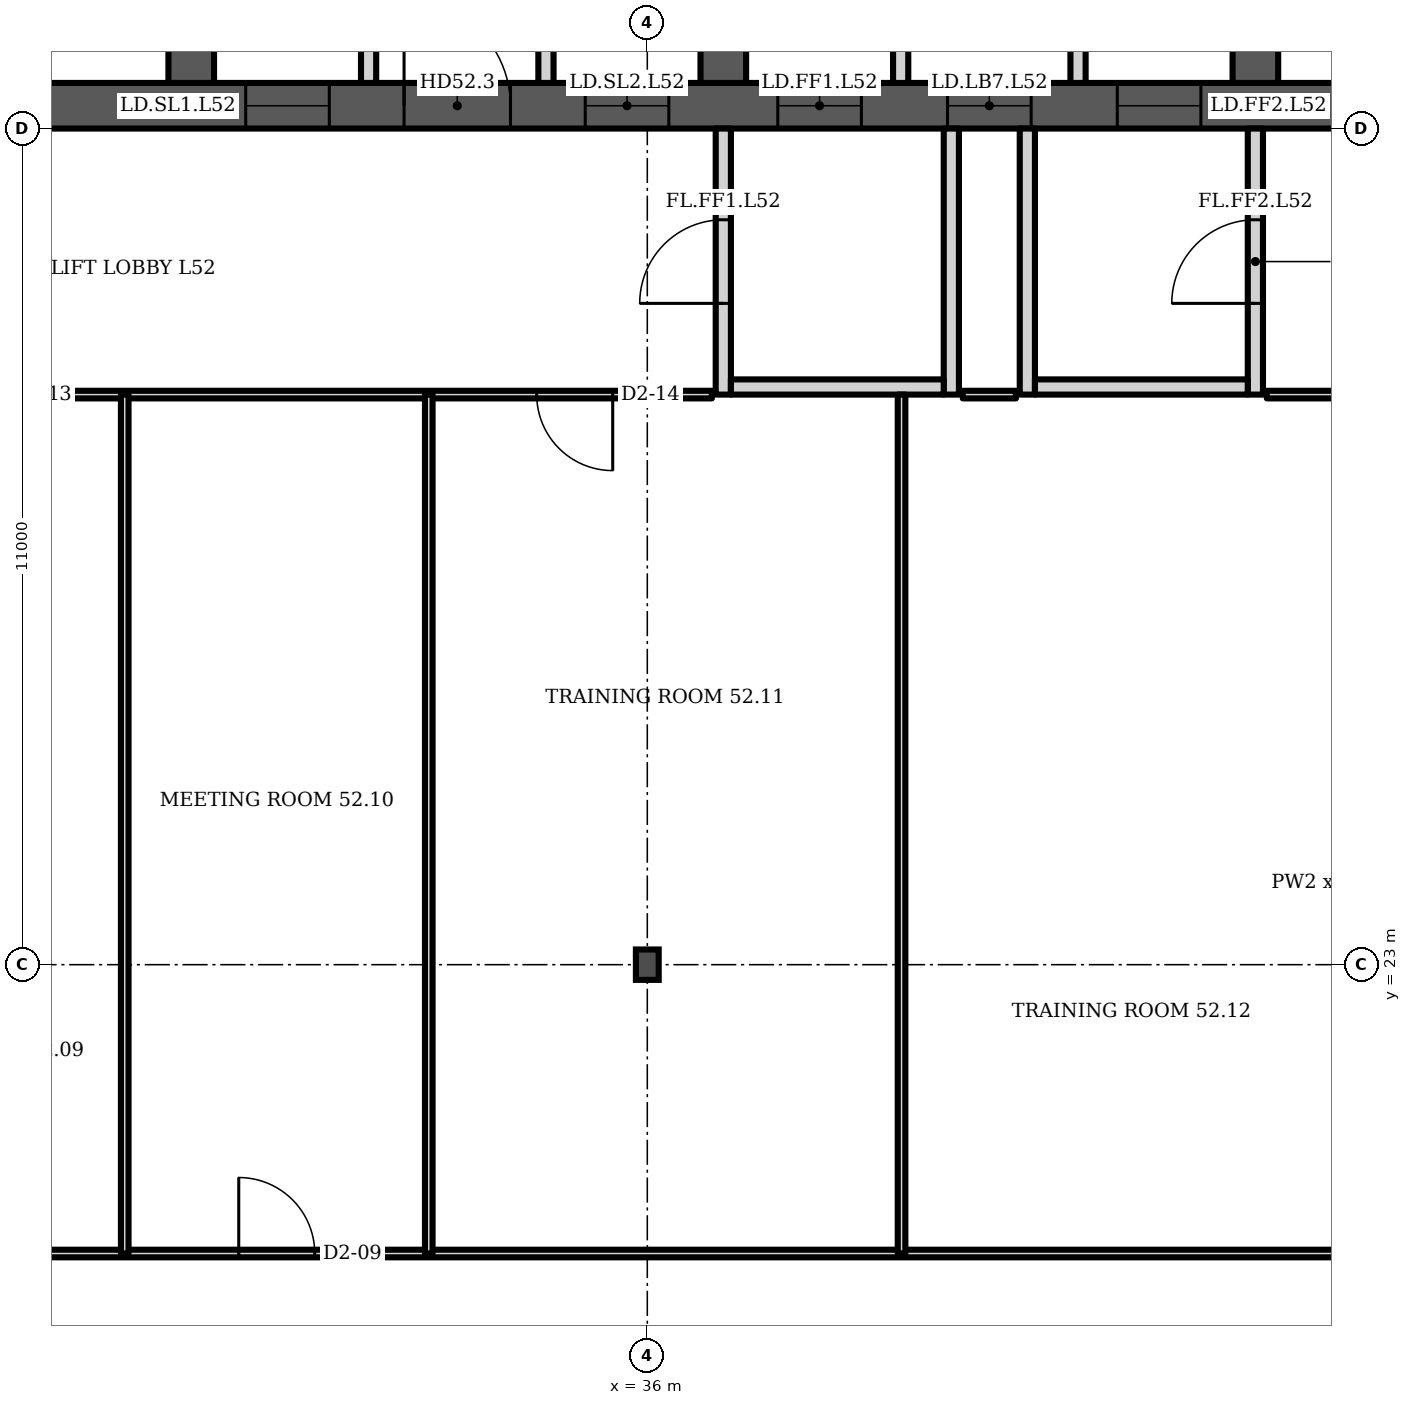
"""IFC4 building model, lengths in metres.
Left out: names, types, materials, properties, quantities, classifications, styles, units other than length and angle.
Written with IfcOpenShell. Run it as: python <this file> out.ifc"""

import sys

from ifc_helpers import new_model, si_unit, direction, frame, frame_2d, origin, origin_2d, place, context, subcontext, project, spatial, polyline, rectangle, i_section, outline, extrude, element, fill, save


model = new_model("IFC4")
c1 = context("Model", 3, precision=1e-05, world=origin(), true_north=direction((0.0, 1.0)))
c2 = subcontext(c1, "Body", "Model", "MODEL_VIEW")
j1 = project(units=[si_unit("LENGTHUNIT", "METRE"), si_unit("PLANEANGLEUNIT", "RADIAN")], contexts=[c1])
p1 = place(None, origin())
s1 = spatial("IfcSite", under=j1, at=p1, CompositionType="ELEMENT")
p2 = place(p1, origin())
s2 = spatial("IfcBuilding", under=s1, at=p2, CompositionType="ELEMENT")
p3 = place(p2, frame((0.0, 0.0, 210.7)))
s3 = spatial("IfcBuildingStorey", under=s2, at=p3, CompositionType="ELEMENT", Elevation=210.7)
p4 = place(p3, frame((23.0, 34.3, 0.0), z_axis=(0.0, 0.0, 1.0), x_axis=(1.0, 0.0, 0.0)))
e1 = element("IfcWall", 1, at=p4, inside=s3, PredefinedType="SHEAR", context=c2, shape_type="SweptSolid", body=[
    extrude(rectangle(XDim=35.0, YDim=0.6, at=frame_2d((17.5, 0.0))), origin(), (0.0, 0.0, 1.0), 3.6),
])
p5 = place(p4, frame((0.65, 0.0, 0.0)))
e2 = element("IfcOpeningElement", 2, at=p5, cuts=e1, PredefinedType="OPENING", context=c2, shape_type="SweptSolid", body=[
    extrude(rectangle(XDim=1.2, YDim=2.1, at=frame_2d((0.6, 1.05))), frame((0.0, 0.31, 0.0), z_axis=(0.0, -1.0, 0.0), x_axis=(1.0, 0.0, 0.0)), (0.0, 0.0, 1.0), 0.62),
])
p6 = place(p4, frame((7.717, 0.0, 0.0)))
e3 = element("IfcOpeningElement", 3, at=p6, cuts=e1, PredefinedType="OPENING", context=c2, shape_type="SweptSolid", body=[
    extrude(rectangle(XDim=1.1, YDim=2.1, at=frame_2d((0.55, 1.05))), frame((0.0, 0.31, 0.0), z_axis=(0.0, -1.0, 0.0), x_axis=(1.0, 0.0, 0.0)), (0.0, 0.0, 1.0), 0.62),
])
p7 = place(p4, frame((12.183, 0.0, 0.0)))
e4 = element("IfcOpeningElement", 4, at=p7, cuts=e1, PredefinedType="OPENING", context=c2, shape_type="SweptSolid", body=[
    extrude(rectangle(XDim=1.1, YDim=2.1, at=frame_2d((0.55, 1.05))), frame((0.0, 0.31, 0.0), z_axis=(0.0, -1.0, 0.0), x_axis=(1.0, 0.0, 0.0)), (0.0, 0.0, 1.0), 0.62),
])
p8 = place(p4, frame((9.8, 0.0, 0.0)))
e5 = element("IfcOpeningElement", 5, at=p8, cuts=e1, PredefinedType="OPENING", context=c2, shape_type="SweptSolid", body=[
    extrude(rectangle(XDim=1.4, YDim=2.1, at=frame_2d((0.7, 1.05))), frame((0.0, 0.31, 0.0), z_axis=(0.0, -1.0, 0.0), x_axis=(1.0, 0.0, 0.0)), (0.0, 0.0, 1.0), 0.62),
])
p9 = place(p4, frame((14.717, 0.0, 0.0)))
e6 = element("IfcOpeningElement", 6, at=p9, cuts=e1, PredefinedType="OPENING", context=c2, shape_type="SweptSolid", body=[
    extrude(rectangle(XDim=1.1, YDim=2.1, at=frame_2d((0.55, 1.05))), frame((0.0, 0.31, 0.0), z_axis=(0.0, -1.0, 0.0), x_axis=(1.0, 0.0, 0.0)), (0.0, 0.0, 1.0), 0.62),
])
p10 = place(p4, frame((16.95, 0.0, 0.0)))
e7 = element("IfcOpeningElement", 7, at=p10, cuts=e1, PredefinedType="OPENING", context=c2, shape_type="SweptSolid", body=[
    extrude(rectangle(XDim=1.1, YDim=2.1, at=frame_2d((0.55, 1.05))), frame((0.0, 0.31, 0.0), z_axis=(0.0, -1.0, 0.0), x_axis=(1.0, 0.0, 0.0)), (0.0, 0.0, 1.0), 0.62),
])
p11 = place(p4, frame((19.183, 0.0, 0.0)))
e8 = element("IfcOpeningElement", 8, at=p11, cuts=e1, PredefinedType="OPENING", context=c2, shape_type="SweptSolid", body=[
    extrude(rectangle(XDim=1.1, YDim=2.1, at=frame_2d((0.55, 1.05))), frame((0.0, 0.31, 0.0), z_axis=(0.0, -1.0, 0.0), x_axis=(1.0, 0.0, 0.0)), (0.0, 0.0, 1.0), 0.62),
])
p12 = place(p4, frame((26.15, 0.0, 0.0)))
e9 = element("IfcOpeningElement", 9, at=p12, cuts=e1, PredefinedType="OPENING", context=c2, shape_type="SweptSolid", body=[
    extrude(rectangle(XDim=1.2, YDim=2.1, at=frame_2d((0.6, 1.05))), frame((0.0, 0.31, 0.0), z_axis=(0.0, -1.0, 0.0), x_axis=(1.0, 0.0, 0.0)), (0.0, 0.0, 1.0), 0.62),
])
p13 = place(p4, frame((28.767, 0.0, 0.0)))
e10 = element("IfcOpeningElement", 10, at=p13, cuts=e1, PredefinedType="OPENING", context=c2, shape_type="SweptSolid", body=[
    extrude(rectangle(XDim=1.0, YDim=2.1, at=frame_2d((0.5, 1.05))), frame((0.0, 0.31, 0.0), z_axis=(0.0, -1.0, 0.0), x_axis=(1.0, 0.0, 0.0)), (0.0, 0.0, 1.0), 0.62),
])
p14 = place(p4, frame((33.083, 0.0, 0.0)))
e11 = element("IfcOpeningElement", 11, at=p14, cuts=e1, PredefinedType="OPENING", context=c2, shape_type="SweptSolid", body=[
    extrude(rectangle(XDim=1.0, YDim=2.1, at=frame_2d((0.5, 1.05))), frame((0.0, 0.31, 0.0), z_axis=(0.0, -1.0, 0.0), x_axis=(1.0, 0.0, 0.0)), (0.0, 0.0, 1.0), 0.62),
])
p15 = place(p4, frame((30.8, 0.0, 0.0)))
e12 = element("IfcOpeningElement", 12, at=p15, cuts=e1, PredefinedType="OPENING", context=c2, shape_type="SweptSolid", body=[
    extrude(rectangle(XDim=1.4, YDim=2.1, at=frame_2d((0.7, 1.05))), frame((0.0, 0.31, 0.0), z_axis=(0.0, -1.0, 0.0), x_axis=(1.0, 0.0, 0.0)), (0.0, 0.0, 1.0), 0.62),
])
p16 = place(p3, frame((30.0, 34.6, 0.0), z_axis=(0.0, 0.0, 1.0), x_axis=(0.0, 1.0, 0.0)))
e13 = element("IfcWall", 13, at=p16, inside=s3, PredefinedType="SHEAR", context=c2, shape_type="SweptSolid", body=[
    extrude(rectangle(XDim=14.171, YDim=0.6, at=frame_2d((7.085, 0.0))), origin(), (0.0, 0.0, 1.0), 3.6),
])
p17 = place(p16, frame((3.8, 0.0, 0.0)))
e14 = element("IfcOpeningElement", 14, at=p17, cuts=e13, PredefinedType="OPENING", context=c2, shape_type="SweptSolid", body=[
    extrude(rectangle(XDim=1.1, YDim=2.1, at=frame_2d((0.55, 1.05))), frame((0.0, 0.31, 0.0), z_axis=(0.0, -1.0, 0.0), x_axis=(1.0, 0.0, 0.0)), (0.0, 0.0, 1.0), 0.62),
])
p18 = place(p3, frame((37.0, 34.6, 0.0), z_axis=(0.0, 0.0, 1.0), x_axis=(0.0, 1.0, 0.0)))
e15 = element("IfcWall", 15, at=p18, inside=s3, PredefinedType="SHEAR", context=c2, shape_type="SweptSolid", body=[
    extrude(rectangle(XDim=14.784, YDim=0.6, at=frame_2d((7.392, 0.0))), origin(), (0.0, 0.0, 1.0), 3.6),
])
p19 = place(p18, frame((11.302, 0.0, 0.0)))
e16 = element("IfcOpeningElement", 16, at=p19, cuts=e15, PredefinedType="OPENING", context=c2, shape_type="SweptSolid", body=[
    extrude(rectangle(XDim=1.0, YDim=2.1, at=frame_2d((0.5, 1.05))), frame((0.0, 0.31, 0.0), z_axis=(0.0, -1.0, 0.0), x_axis=(1.0, 0.0, 0.0)), (0.0, 0.0, 1.0), 0.62),
])
p20 = place(p18, frame((3.8, 0.0, 0.0)))
e17 = element("IfcOpeningElement", 17, at=p20, cuts=e15, PredefinedType="OPENING", context=c2, shape_type="SweptSolid", body=[
    extrude(rectangle(XDim=1.1, YDim=2.1, at=frame_2d((0.55, 1.05))), frame((0.0, 0.31, 0.0), z_axis=(0.0, -1.0, 0.0), x_axis=(1.0, 0.0, 0.0)), (0.0, 0.0, 1.0), 0.62),
])
p21 = place(p3, frame((44.0, 34.6, 0.0), z_axis=(0.0, 0.0, 1.0), x_axis=(0.0, 1.0, 0.0)))
e18 = element("IfcWall", 18, at=p21, inside=s3, PredefinedType="SHEAR", context=c2, shape_type="SweptSolid", body=[
    extrude(rectangle(XDim=14.784, YDim=0.6, at=frame_2d((7.392, 0.0))), origin(), (0.0, 0.0, 1.0), 3.6),
])
p22 = place(p21, frame((11.608, 0.0, 0.0)))
e19 = element("IfcOpeningElement", 19, at=p22, cuts=e18, PredefinedType="OPENING", context=c2, shape_type="SweptSolid", body=[
    extrude(rectangle(XDim=1.0, YDim=2.1, at=frame_2d((0.5, 1.05))), frame((0.0, 0.31, 0.0), z_axis=(0.0, -1.0, 0.0), x_axis=(1.0, 0.0, 0.0)), (0.0, 0.0, 1.0), 0.62),
])
p23 = place(p21, frame((3.8, 0.0, 0.0)))
e20 = element("IfcOpeningElement", 20, at=p23, cuts=e18, PredefinedType="OPENING", context=c2, shape_type="SweptSolid", body=[
    extrude(rectangle(XDim=1.1, YDim=2.1, at=frame_2d((0.55, 1.05))), frame((0.0, 0.31, 0.0), z_axis=(0.0, -1.0, 0.0), x_axis=(1.0, 0.0, 0.0)), (0.0, 0.0, 1.0), 0.62),
])
p24 = place(p3, frame((36.0, 23.0, 0.0), z_axis=(0.0, 0.0, 1.0), x_axis=(1.0, 0.0, 0.0)))
e21 = element("IfcColumn", 21, at=p24, inside=s3, PredefinedType="COLUMN", context=c2, shape_type="SweptSolid", body=[
    extrude(i_section(OverallWidth=0.3, OverallDepth=0.4, WebThickness=0.013, FlangeThickness=0.024, FilletRadius=0.027, at=origin_2d()), origin(), (0.0, 0.0, 1.0), 3.6),
])
p25 = place(p3, frame((0.0, 0.0, -0.0)))
e22 = element("IfcWall", 22, at=p25, inside=s3, PredefinedType="PARTITIONING", context=c2, shape_type="SweptSolid", body=[
    extrude(outline(polyline([(32.233, 37.45), (30.3, 37.45), (30.3, 37.65), (32.233, 37.65), (32.433, 37.65), (32.433, 34.6), (32.233, 34.6), (32.233, 37.45)])), origin(), (0.0, 0.0, 1.0), 3.2),
])
p26 = place(p3, frame((0.0, 0.0, -0.0)))
e23 = element("IfcWall", 23, at=p26, inside=s3, PredefinedType="PARTITIONING", context=c2, shape_type="SweptSolid", body=[
    extrude(outline(polyline([(34.567, 37.65), (34.767, 37.65), (36.7, 37.65), (36.7, 37.45), (34.767, 37.45), (34.767, 34.6), (34.567, 34.6), (34.567, 37.65)])), origin(), (0.0, 0.0, 1.0), 3.2),
])
p27 = place(p3, frame((0.0, 0.0, -0.0)))
e24 = element("IfcWall", 24, at=p27, inside=s3, PredefinedType="PARTITIONING", context=c2, shape_type="SweptSolid", body=[
    extrude(outline(polyline([(41.567, 37.1), (39.433, 37.1), (39.433, 34.6), (39.233, 34.6), (39.233, 37.45), (37.3, 37.45), (37.3, 37.65), (39.233, 37.65), (39.433, 37.65), (39.433, 37.3), (41.567, 37.3), (41.567, 37.35), (41.767, 37.35), (43.7, 37.35), (43.7, 37.15), (41.767, 37.15), (41.767, 34.6), (41.567, 34.6), (41.567, 37.1)])), origin(), (0.0, 0.0, 1.0), 3.2),
])
p28 = place(p3, frame((37.0, 30.5, 0.0), z_axis=(0.0, 0.0, 1.0), x_axis=(0.0, 1.0, 0.0)))
e25 = element("IfcWall", 25, at=p28, inside=s3, PredefinedType="PARTITIONING", context=c2, shape_type="SweptSolid", body=[
    extrude(rectangle(XDim=3.5, YDim=0.2, at=frame_2d((1.75, 0.0))), origin(), (0.0, 0.0, 1.0), 3.2),
])
p29 = place(p28, frame((1.2, 0.0, 0.0)))
e26 = element("IfcOpeningElement", 26, at=p29, cuts=e25, PredefinedType="OPENING", context=c2, shape_type="SweptSolid", body=[
    extrude(rectangle(XDim=1.1, YDim=2.1, at=frame_2d((0.55, 1.05))), frame((0.0, 0.11, 0.0), z_axis=(0.0, -1.0, 0.0), x_axis=(1.0, 0.0, 0.0)), (0.0, 0.0, 1.0), 0.22),
])
p30 = place(p3, frame((40.0, 30.5, 0.0), z_axis=(0.0, 0.0, 1.0), x_axis=(0.0, 1.0, 0.0)))
e27 = element("IfcWall", 27, at=p30, inside=s3, PredefinedType="PARTITIONING", context=c2, shape_type="SweptSolid", body=[
    extrude(rectangle(XDim=3.5, YDim=0.2, at=frame_2d((1.75, 0.0))), origin(), (0.0, 0.0, 1.0), 3.2),
])
p31 = place(p3, frame((37.1, 30.6, 0.0), z_axis=(0.0, 0.0, 1.0), x_axis=(1.0, 0.0, 0.0)))
e28 = element("IfcWall", 28, at=p31, inside=s3, PredefinedType="PARTITIONING", context=c2, shape_type="SweptSolid", body=[
    extrude(rectangle(XDim=2.8, YDim=0.2, at=frame_2d((1.4, 0.0))), origin(), (0.0, 0.0, 1.0), 3.2),
])
p32 = place(p3, frame((41.0, 30.5, 0.0), z_axis=(0.0, 0.0, 1.0), x_axis=(0.0, 1.0, 0.0)))
e29 = element("IfcWall", 29, at=p32, inside=s3, PredefinedType="PARTITIONING", context=c2, shape_type="SweptSolid", body=[
    extrude(rectangle(XDim=3.5, YDim=0.2, at=frame_2d((1.75, 0.0))), origin(), (0.0, 0.0, 1.0), 3.2),
])
p33 = place(p3, frame((44.0, 30.5, 0.0), z_axis=(0.0, 0.0, 1.0), x_axis=(0.0, 1.0, 0.0)))
e30 = element("IfcWall", 30, at=p33, inside=s3, PredefinedType="PARTITIONING", context=c2, shape_type="SweptSolid", body=[
    extrude(rectangle(XDim=3.5, YDim=0.2, at=frame_2d((1.75, 0.0))), origin(), (0.0, 0.0, 1.0), 3.2),
])
p34 = place(p33, frame((1.2, 0.0, 0.0)))
e31 = element("IfcOpeningElement", 31, at=p34, cuts=e30, PredefinedType="OPENING", context=c2, shape_type="SweptSolid", body=[
    extrude(rectangle(XDim=1.1, YDim=2.1, at=frame_2d((0.55, 1.05))), frame((0.0, 0.11, 0.0), z_axis=(0.0, -1.0, 0.0), x_axis=(1.0, 0.0, 0.0)), (0.0, 0.0, 1.0), 0.22),
])
p35 = place(p3, frame((41.1, 30.6, 0.0), z_axis=(0.0, 0.0, 1.0), x_axis=(1.0, 0.0, 0.0)))
e32 = element("IfcWall", 32, at=p35, inside=s3, PredefinedType="PARTITIONING", context=c2, shape_type="SweptSolid", body=[
    extrude(rectangle(XDim=2.8, YDim=0.2, at=frame_2d((1.4, 0.0))), origin(), (0.0, 0.0, 1.0), 3.2),
])
p36 = place(p3, frame((23.0, 30.5, 0.0), z_axis=(0.0, 0.0, 1.0), x_axis=(1.0, 0.0, 0.0)))
e33 = element("IfcWall", 33, at=p36, inside=s3, PredefinedType="PARTITIONING", context=c2, shape_type="SweptSolid", body=[
    extrude(rectangle(XDim=13.85, YDim=0.1, at=frame_2d((6.925, 0.0))), origin(), (0.0, 0.0, 1.0), 3.2),
])
p37 = place(p36, frame((3.545, 0.0, 0.0)))
e34 = element("IfcOpeningElement", 34, at=p37, cuts=e33, PredefinedType="OPENING", context=c2, shape_type="SweptSolid", body=[
    extrude(rectangle(XDim=1.0, YDim=2.1, at=frame_2d((0.5, 1.05))), frame((0.0, 0.06, 0.0), z_axis=(0.0, -1.0, 0.0), x_axis=(1.0, 0.0, 0.0)), (0.0, 0.0, 1.0), 0.12),
])
p38 = place(p36, frame((11.545, 0.0, 0.0)))
e35 = element("IfcOpeningElement", 35, at=p38, cuts=e33, PredefinedType="OPENING", context=c2, shape_type="SweptSolid", body=[
    extrude(rectangle(XDim=1.0, YDim=2.1, at=frame_2d((0.5, 1.05))), frame((0.0, 0.06, 0.0), z_axis=(0.0, -1.0, 0.0), x_axis=(1.0, 0.0, 0.0)), (0.0, 0.0, 1.0), 0.12),
])
p39 = place(p3, frame((24.8, 19.2, 0.0), z_axis=(0.0, 0.0, 1.0), x_axis=(1.0, 0.0, 0.0)))
e36 = element("IfcWall", 36, at=p39, inside=s3, PredefinedType="PARTITIONING", context=c2, shape_type="SweptSolid", body=[
    extrude(rectangle(XDim=20.76, YDim=0.1, at=frame_2d((10.38, 0.0))), origin(), (0.0, 0.0, 1.0), 3.2),
])
p40 = place(p39, frame((5.825, 0.0, 0.0)))
e37 = element("IfcOpeningElement", 37, at=p40, cuts=e36, PredefinedType="OPENING", context=c2, shape_type="SweptSolid", body=[
    extrude(rectangle(XDim=1.0, YDim=2.1, at=frame_2d((0.5, 1.05))), frame((0.0, 0.06, 0.0), z_axis=(0.0, -1.0, 0.0), x_axis=(1.0, 0.0, 0.0)), (0.0, 0.0, 1.0), 0.12),
])
for number, where, z_axis, x_axis in (
    (38, (29.125, 19.2, 0.0), (0.0, 0.0, 1.0), (0.0, 1.0, 0.0)),
    (39, (33.125, 19.2, 0.0), (0.0, 0.0, 1.0), (0.0, 1.0, 0.0)),
    (40, (39.345, 19.2, 0.0), (0.0, 0.0, 1.0), (0.0, 1.0, 0.0)),
):
    element("IfcWall", number, at=place(p3, frame(where, z_axis=z_axis, x_axis=x_axis)), inside=s3, PredefinedType="PARTITIONING", context=c2, shape_type="SweptSolid", body=[
        extrude(rectangle(XDim=11.3, YDim=0.1, at=frame_2d((5.65, 0.0))), origin(), (0.0, 0.0, 1.0), 3.2),
    ])
p41 = place(p3, frame((40.15, 30.5, 0.0), z_axis=(0.0, 0.0, 1.0), x_axis=(1.0, 0.0, 0.0)))
e41 = element("IfcWall", 41, at=p41, inside=s3, PredefinedType="PARTITIONING", context=c2, shape_type="SweptSolid", body=[
    extrude(rectangle(XDim=0.7, YDim=0.1, at=frame_2d((0.35, 0.0))), origin(), (0.0, 0.0, 1.0), 3.2),
])
p42 = place(p3, frame((44.15, 30.5, 0.0), z_axis=(0.0, 0.0, 1.0), x_axis=(1.0, 0.0, 0.0)))
e42 = element("IfcWall", 42, at=p42, inside=s3, PredefinedType="PARTITIONING", context=c2, shape_type="SweptSolid", body=[
    extrude(rectangle(XDim=1.41, YDim=0.1, at=frame_2d((0.705, 0.0))), origin(), (0.0, 0.0, 1.0), 3.2),
])
p43 = place(p6, origin())
e43 = element("IfcDoor", 43, at=p43, inside=s3, OperationType="DOUBLE_DOOR_SLIDING", PredefinedType="DOOR", context=c2, shape_type="SweptSolid", body=[
    extrude(rectangle(XDim=1.1, YDim=2.1, at=frame_2d((0.55, 1.05))), frame((0.0, 0.025, 0.0), z_axis=(0.0, -1.0, 0.0), x_axis=(1.0, 0.0, 0.0)), (0.0, 0.0, 1.0), 0.05),
])
fill(e3, e43)
p44 = place(p7, origin())
e44 = element("IfcDoor", 44, at=p44, inside=s3, OperationType="DOUBLE_DOOR_SLIDING", PredefinedType="DOOR", context=c2, shape_type="SweptSolid", body=[
    extrude(rectangle(XDim=1.1, YDim=2.1, at=frame_2d((0.55, 1.05))), frame((0.0, 0.025, 0.0), z_axis=(0.0, -1.0, 0.0), x_axis=(1.0, 0.0, 0.0)), (0.0, 0.0, 1.0), 0.05),
])
fill(e4, e44)
p45 = place(p8, origin())
e45 = element("IfcDoor", 45, at=p45, inside=s3, OperationType="DOUBLE_DOOR_SINGLE_SWING", PredefinedType="DOOR", context=c2, shape_type="SweptSolid", body=[
    extrude(rectangle(XDim=1.4, YDim=2.1, at=frame_2d((0.7, 1.05))), frame((0.0, 0.025, 0.0), z_axis=(0.0, -1.0, 0.0), x_axis=(1.0, 0.0, 0.0)), (0.0, 0.0, 1.0), 0.05),
])
fill(e5, e45)
p46 = place(p9, origin())
e46 = element("IfcDoor", 46, at=p46, inside=s3, OperationType="DOUBLE_DOOR_SLIDING", PredefinedType="DOOR", context=c2, shape_type="SweptSolid", body=[
    extrude(rectangle(XDim=1.1, YDim=2.1, at=frame_2d((0.55, 1.05))), frame((0.0, 0.025, 0.0), z_axis=(0.0, -1.0, 0.0), x_axis=(1.0, 0.0, 0.0)), (0.0, 0.0, 1.0), 0.05),
])
fill(e6, e46)
p47 = place(p10, origin())
e47 = element("IfcDoor", 47, at=p47, inside=s3, OperationType="DOUBLE_DOOR_SLIDING", PredefinedType="DOOR", context=c2, shape_type="SweptSolid", body=[
    extrude(rectangle(XDim=1.1, YDim=2.1, at=frame_2d((0.55, 1.05))), frame((0.0, 0.025, 0.0), z_axis=(0.0, -1.0, 0.0), x_axis=(1.0, 0.0, 0.0)), (0.0, 0.0, 1.0), 0.05),
])
fill(e7, e47)
p48 = place(p11, origin())
e48 = element("IfcDoor", 48, at=p48, inside=s3, OperationType="DOUBLE_DOOR_SLIDING", PredefinedType="DOOR", context=c2, shape_type="SweptSolid", body=[
    extrude(rectangle(XDim=1.1, YDim=2.1, at=frame_2d((0.55, 1.05))), frame((0.0, 0.025, 0.0), z_axis=(0.0, -1.0, 0.0), x_axis=(1.0, 0.0, 0.0)), (0.0, 0.0, 1.0), 0.05),
])
fill(e8, e48)
p49 = place(p29, origin())
e49 = element("IfcDoor", 49, at=p49, inside=s3, OperationType="SINGLE_SWING_LEFT", PredefinedType="DOOR", context=c2, shape_type="SweptSolid", body=[
    extrude(rectangle(XDim=1.1, YDim=2.1, at=frame_2d((0.55, 1.05))), frame((0.0, 0.025, 0.0), z_axis=(0.0, -1.0, 0.0), x_axis=(1.0, 0.0, 0.0)), (0.0, 0.0, 1.0), 0.05),
])
fill(e26, e49)
p50 = place(p34, origin())
e50 = element("IfcDoor", 50, at=p50, inside=s3, OperationType="SINGLE_SWING_LEFT", PredefinedType="DOOR", context=c2, shape_type="SweptSolid", body=[
    extrude(rectangle(XDim=1.1, YDim=2.1, at=frame_2d((0.55, 1.05))), frame((0.0, 0.025, 0.0), z_axis=(0.0, -1.0, 0.0), x_axis=(1.0, 0.0, 0.0)), (0.0, 0.0, 1.0), 0.05),
])
fill(e31, e50)
p51 = place(p40, origin())
e51 = element("IfcDoor", 51, at=p51, inside=s3, OperationType="SINGLE_SWING_LEFT", PredefinedType="DOOR", context=c2, shape_type="SweptSolid", body=[
    extrude(rectangle(XDim=1.0, YDim=2.1, at=frame_2d((0.5, 1.05))), frame((0.0, 0.025, 0.0), z_axis=(0.0, -1.0, 0.0), x_axis=(1.0, 0.0, 0.0)), (0.0, 0.0, 1.0), 0.05),
])
fill(e37, e51)
p52 = place(p38, origin())
e52 = element("IfcDoor", 52, at=p52, inside=s3, OperationType="SINGLE_SWING_RIGHT", PredefinedType="DOOR", context=c2, shape_type="SweptSolid", body=[
    extrude(rectangle(XDim=1.0, YDim=2.1, at=frame_2d((0.5, 1.05))), frame((0.0, 0.025, 0.0), z_axis=(0.0, -1.0, 0.0), x_axis=(1.0, 0.0, 0.0)), (0.0, 0.0, 1.0), 0.05),
])
fill(e35, e52)
save(model, sys.argv[1])
